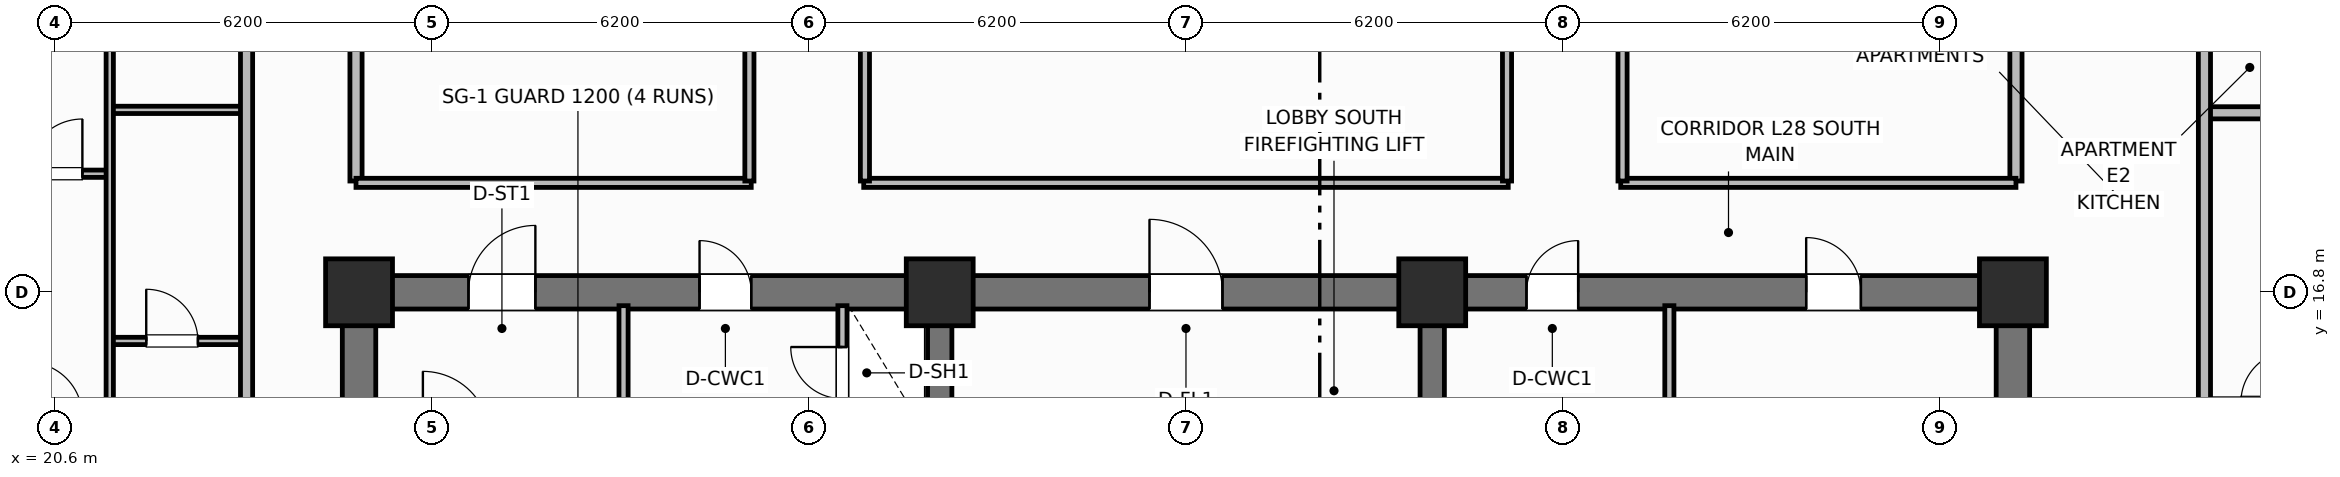
"""IFC4 building model, lengths in metres.
Left out: names, types, materials, properties, quantities, classifications, styles, units other than length and angle.
Written with IfcOpenShell. Run it as: python <this file> out.ifc"""

import sys

from ifc_helpers import new_model, si_unit, direction, frame, frame_2d, origin, origin_2d, place, context, subcontext, project, spatial, rectangle, extrude, element, fill, save


model = new_model("IFC4")
c1 = context("Model", 3, precision=1e-05, world=origin(), true_north=direction((0.0, 1.0)))
c2 = subcontext(c1, "Body", "Model", "MODEL_VIEW")
j1 = project(units=[si_unit("LENGTHUNIT", "METRE"), si_unit("PLANEANGLEUNIT", "RADIAN")], contexts=[c1])
p1 = place(None, origin())
s1 = spatial("IfcSite", under=j1, at=p1, CompositionType="ELEMENT")
p2 = place(p1, origin())
s2 = spatial("IfcBuilding", under=s1, at=p2, CompositionType="ELEMENT")
p3 = place(p2, frame((0.0, 0.0, 114.2)))
s3 = spatial("IfcBuildingStorey", under=s2, at=p3, CompositionType="ELEMENT", Elevation=114.2)
for number, where, z_axis, x_axis in (
    (1, (25.6, 10.875, 0.0), (0.0, 0.0, 1.0), (0.0, 1.0, 0.0)),
    (2, (52.8, 10.875, 0.0), (0.0, 0.0, 1.0), (0.0, 1.0, 0.0)),
):
    element("IfcWall", number, at=place(p3, frame(where, z_axis=z_axis, x_axis=x_axis)), inside=s3, PredefinedType="SHEAR", context=c2, shape_type="SweptSolid", body=[
        extrude(rectangle(XDim=5.65, YDim=0.55, at=frame_2d((2.825, 0.0))), origin(), (0.0, 0.0, 1.0), 3.7),
    ])
p4 = place(p3, frame((25.6, 16.8, 0.0), z_axis=(0.0, 0.0, 1.0), x_axis=(1.0, 0.0, 0.0)))
e3 = element("IfcWall", 3, at=p4, inside=s3, PredefinedType="SHEAR", context=c2, shape_type="SweptSolid", body=[
    extrude(rectangle(XDim=27.2, YDim=0.55, at=frame_2d((13.6, 0.0))), origin(), (0.0, 0.0, 1.0), 3.7),
])
p5 = place(p4, frame((1.8, 0.0, 0.0)))
e4 = element("IfcOpeningElement", 4, at=p5, cuts=e3, PredefinedType="OPENING", context=c2, shape_type="SweptSolid", body=[
    extrude(rectangle(XDim=1.1, YDim=2.15, at=frame_2d((0.55, 1.075))), frame((0.0, 0.285, 0.0), z_axis=(0.0, -1.0, 0.0), x_axis=(1.0, 0.0, 0.0)), (0.0, 0.0, 1.0), 0.57),
])
p6 = place(p4, frame((5.6, 0.0, 0.0)))
e5 = element("IfcOpeningElement", 5, at=p6, cuts=e3, PredefinedType="OPENING", context=c2, shape_type="SweptSolid", body=[
    extrude(rectangle(XDim=0.85, YDim=2.1, at=frame_2d((0.425, 1.05))), frame((0.0, 0.285, 0.0), z_axis=(0.0, -1.0, 0.0), x_axis=(1.0, 0.0, 0.0)), (0.0, 0.0, 1.0), 0.57),
])
p7 = place(p4, frame((13.0, 0.0, 0.0)))
e6 = element("IfcOpeningElement", 6, at=p7, cuts=e3, PredefinedType="OPENING", context=c2, shape_type="SweptSolid", body=[
    extrude(rectangle(XDim=1.2, YDim=2.15, at=frame_2d((0.6, 1.075))), frame((0.0, 0.285, 0.0), z_axis=(0.0, -1.0, 0.0), x_axis=(1.0, 0.0, 0.0)), (0.0, 0.0, 1.0), 0.57),
])
p8 = place(p4, frame((19.2, 0.0, 0.0)))
e7 = element("IfcOpeningElement", 7, at=p8, cuts=e3, PredefinedType="OPENING", context=c2, shape_type="SweptSolid", body=[
    extrude(rectangle(XDim=0.85, YDim=2.1, at=frame_2d((0.425, 1.05))), frame((0.0, 0.285, 0.0), z_axis=(0.0, -1.0, 0.0), x_axis=(1.0, 0.0, 0.0)), (0.0, 0.0, 1.0), 0.57),
])
p9 = place(p4, frame((23.8, 0.0, 0.0)))
e8 = element("IfcOpeningElement", 8, at=p9, cuts=e3, PredefinedType="OPENING", context=c2, shape_type="SweptSolid", body=[
    extrude(rectangle(XDim=0.9, YDim=2.1, at=frame_2d((0.45, 1.05))), frame((0.0, 0.285, 0.0), z_axis=(0.0, -1.0, 0.0), x_axis=(1.0, 0.0, 0.0)), (0.0, 0.0, 1.0), 0.57),
])
for number, where, z_axis, x_axis in (
    (9, (35.15, 10.875, 0.0), (0.0, 0.0, 1.0), (0.0, 1.0, 0.0)),
    (10, (43.25, 10.875, 0.0), (0.0, 0.0, 1.0), (0.0, 1.0, 0.0)),
):
    element("IfcWall", number, at=place(p3, frame(where, z_axis=z_axis, x_axis=x_axis)), inside=s3, PredefinedType="SHEAR", context=c2, shape_type="SweptSolid", body=[
        extrude(rectangle(XDim=5.65, YDim=0.4, at=frame_2d((2.825, 0.0))), origin(), (0.0, 0.0, 1.0), 3.7),
    ])
for number, where, z_axis, x_axis in (
    (11, (25.6, 16.8, 0.0), (0.0, 0.0, 1.0), (1.0, 0.0, 0.0)),
    (12, (35.15, 16.8, 0.0), (0.0, 0.0, 1.0), (1.0, 0.0, 0.0)),
    (13, (43.25, 16.8, 0.0), (0.0, 0.0, 1.0), (1.0, 0.0, 0.0)),
    (14, (52.8, 16.8, 0.0), (0.0, 0.0, 1.0), (1.0, 0.0, 0.0)),
):
    element("IfcColumn", number, at=place(p3, frame(where, z_axis=z_axis, x_axis=x_axis)), inside=s3, PredefinedType="COLUMN", context=c2, shape_type="SweptSolid", body=[
        extrude(rectangle(XDim=1.1, YDim=1.1, at=origin_2d()), origin(), (0.0, 0.0, 1.0), 3.7),
    ])
p10 = place(p3, frame((29.95, 14.5, 0.0), z_axis=(0.0, 0.0, 1.0), x_axis=(0.0, 1.0, 0.0)))
e15 = element("IfcWall", 15, at=p10, inside=s3, PredefinedType="PARTITIONING", context=c2, shape_type="SweptSolid", body=[
    extrude(rectangle(XDim=2.08, YDim=0.15, at=frame_2d((1.04, 0.0))), origin(), (0.0, 0.0, 1.0), 2.53),
])
p11 = place(p3, frame((33.55, 14.5, 0.0), z_axis=(0.0, 0.0, 1.0), x_axis=(0.0, 1.0, 0.0)))
e16 = element("IfcWall", 16, at=p11, inside=s3, PredefinedType="PARTITIONING", context=c2, shape_type="SweptSolid", body=[
    extrude(rectangle(XDim=2.08, YDim=0.15, at=frame_2d((1.04, 0.0))), origin(), (0.0, 0.0, 1.0), 2.53),
])
p12 = place(p11, frame((0.55, 0.0, 0.0)))
e17 = element("IfcOpeningElement", 17, at=p12, cuts=e16, PredefinedType="OPENING", context=c2, shape_type="SweptSolid", body=[
    extrude(rectangle(XDim=0.85, YDim=2.05, at=frame_2d((0.425, 1.025))), frame((0.0, 0.085, 0.0), z_axis=(0.0, -1.0, 0.0), x_axis=(1.0, 0.0, 0.0)), (0.0, 0.0, 1.0), 0.17),
])
p13 = place(p3, frame((47.15, 10.95, 0.0), z_axis=(0.0, 0.0, 1.0), x_axis=(0.0, 1.0, 0.0)))
e18 = element("IfcWall", 18, at=p13, inside=s3, PredefinedType="PARTITIONING", context=c2, shape_type="SweptSolid", body=[
    extrude(rectangle(XDim=5.63, YDim=0.15, at=frame_2d((2.815, 0.0))), origin(), (0.0, 0.0, 1.0), 2.53),
])
for number, where, z_axis, x_axis in (
    (19, (25.55, 18.63, 0.0), (0.0, 0.0, 1.0), (0.0, 1.0, 0.0)),
    (20, (52.85, 18.63, 0.0), (0.0, 0.0, 1.0), (0.0, 1.0, 0.0)),
):
    element("IfcWall", number, at=place(p3, frame(where, z_axis=z_axis, x_axis=x_axis)), inside=s3, PredefinedType="PARTITIONING", context=c2, shape_type="SweptSolid", body=[
        extrude(rectangle(XDim=19.14, YDim=0.2, at=frame_2d((9.57, 0.0))), origin(), (0.0, 0.0, 1.0), 2.53),
    ])
p14 = place(p3, frame((25.55, 18.6, 0.0), z_axis=(0.0, 0.0, 1.0), x_axis=(1.0, 0.0, 0.0)))
e21 = element("IfcWall", 21, at=p14, inside=s3, PredefinedType="PARTITIONING", context=c2, shape_type="SweptSolid", body=[
    extrude(rectangle(XDim=6.5, YDim=0.15, at=frame_2d((3.25, 0.0))), origin(), (0.0, 0.0, 1.0), 2.53),
])
p15 = place(p3, frame((33.9, 18.6, 0.0), z_axis=(0.0, 0.0, 1.0), x_axis=(1.0, 0.0, 0.0)))
e22 = element("IfcWall", 22, at=p15, inside=s3, PredefinedType="PARTITIONING", context=c2, shape_type="SweptSolid", body=[
    extrude(rectangle(XDim=10.6, YDim=0.15, at=frame_2d((5.3, 0.0))), origin(), (0.0, 0.0, 1.0), 2.53),
])
p16 = place(p3, frame((46.35, 18.6, 0.0), z_axis=(0.0, 0.0, 1.0), x_axis=(1.0, 0.0, 0.0)))
e23 = element("IfcWall", 23, at=p16, inside=s3, PredefinedType="PARTITIONING", context=c2, shape_type="SweptSolid", body=[
    extrude(rectangle(XDim=6.5, YDim=0.15, at=frame_2d((3.25, 0.0))), origin(), (0.0, 0.0, 1.0), 2.53),
])
p17 = place(p3, frame((32.02, 18.63, 0.0), z_axis=(0.0, 0.0, 1.0), x_axis=(0.0, 1.0, 0.0)))
e24 = element("IfcWall", 24, at=p17, inside=s3, PredefinedType="PARTITIONING", context=c2, shape_type="SweptSolid", body=[
    extrude(rectangle(XDim=19.14, YDim=0.15, at=frame_2d((9.57, 0.0))), origin(), (0.0, 0.0, 1.0), 2.53),
])
p18 = place(p17, frame((5.5, 0.0, 0.0)))
e25 = element("IfcOpeningElement", 25, at=p18, cuts=e24, PredefinedType="OPENING", context=c2, shape_type="SweptSolid", body=[
    extrude(rectangle(XDim=1.0, YDim=2.15, at=frame_2d((0.5, 1.075))), frame((0.0, 0.085, 0.0), z_axis=(0.0, -1.0, 0.0), x_axis=(1.0, 0.0, 0.0)), (0.0, 0.0, 1.0), 0.17),
])
p19 = place(p3, frame((33.92, 18.63, 0.0), z_axis=(0.0, 0.0, 1.0), x_axis=(0.0, 1.0, 0.0)))
e26 = element("IfcWall", 26, at=p19, inside=s3, PredefinedType="PARTITIONING", context=c2, shape_type="SweptSolid", body=[
    extrude(rectangle(XDim=19.14, YDim=0.15, at=frame_2d((9.57, 0.0))), origin(), (0.0, 0.0, 1.0), 2.53),
])
p20 = place(p19, frame((2.4, 0.0, 0.0)))
e27 = element("IfcOpeningElement", 27, at=p20, cuts=e26, PredefinedType="OPENING", context=c2, shape_type="SweptSolid", body=[
    extrude(rectangle(XDim=1.0, YDim=2.15, at=frame_2d((0.5, 1.075))), frame((0.0, 0.085, 0.0), z_axis=(0.0, -1.0, 0.0), x_axis=(1.0, 0.0, 0.0)), (0.0, 0.0, 1.0), 0.17),
])
p21 = place(p3, frame((44.48, 18.63, 0.0), z_axis=(0.0, 0.0, 1.0), x_axis=(0.0, 1.0, 0.0)))
e28 = element("IfcWall", 28, at=p21, inside=s3, PredefinedType="PARTITIONING", context=c2, shape_type="SweptSolid", body=[
    extrude(rectangle(XDim=19.14, YDim=0.15, at=frame_2d((9.57, 0.0))), origin(), (0.0, 0.0, 1.0), 2.53),
])
p22 = place(p21, frame((10.804, 0.0, 0.0)))
e29 = element("IfcOpeningElement", 29, at=p22, cuts=e28, PredefinedType="OPENING", context=c2, shape_type="SweptSolid", body=[
    extrude(rectangle(XDim=1.0, YDim=2.15, at=frame_2d((0.5, 1.075))), frame((0.0, 0.085, 0.0), z_axis=(0.0, -1.0, 0.0), x_axis=(1.0, 0.0, 0.0)), (0.0, 0.0, 1.0), 0.17),
])
p23 = place(p3, frame((46.38, 18.63, 0.0), z_axis=(0.0, 0.0, 1.0), x_axis=(0.0, 1.0, 0.0)))
e30 = element("IfcWall", 30, at=p23, inside=s3, PredefinedType="PARTITIONING", context=c2, shape_type="SweptSolid", body=[
    extrude(rectangle(XDim=19.14, YDim=0.15, at=frame_2d((9.57, 0.0))), origin(), (0.0, 0.0, 1.0), 2.53),
])
p24 = place(p23, frame((5.5, 0.0, 0.0)))
e31 = element("IfcOpeningElement", 31, at=p24, cuts=e30, PredefinedType="OPENING", context=c2, shape_type="SweptSolid", body=[
    extrude(rectangle(XDim=1.0, YDim=2.15, at=frame_2d((0.5, 1.075))), frame((0.0, 0.085, 0.0), z_axis=(0.0, -1.0, 0.0), x_axis=(1.0, 0.0, 0.0)), (0.0, 0.0, 1.0), 0.17),
])
p25 = place(p3, frame((21.5, 16.0, 0.0), z_axis=(0.0, 0.0, 1.0), x_axis=(1.0, 0.0, 0.0)))
e32 = element("IfcWall", 32, at=p25, inside=s3, PredefinedType="PARTITIONING", context=c2, shape_type="SweptSolid", body=[
    extrude(rectangle(XDim=2.25, YDim=0.12, at=frame_2d((1.125, 0.0))), origin(), (0.0, 0.0, 1.0), 2.53),
])
p26 = place(p25, frame((0.6, 0.0, 0.0)))
e33 = element("IfcOpeningElement", 33, at=p26, cuts=e32, PredefinedType="OPENING", context=c2, shape_type="SweptSolid", body=[
    extrude(rectangle(XDim=0.85, YDim=2.1, at=frame_2d((0.425, 1.05))), frame((0.0, 0.07, 0.0), z_axis=(0.0, -1.0, 0.0), x_axis=(1.0, 0.0, 0.0)), (0.0, 0.0, 1.0), 0.14),
])
p27 = place(p3, frame((21.5, 19.8, 0.0), z_axis=(0.0, 0.0, 1.0), x_axis=(1.0, 0.0, 0.0)))
e34 = element("IfcWall", 34, at=p27, inside=s3, PredefinedType="PARTITIONING", context=c2, shape_type="SweptSolid", body=[
    extrude(rectangle(XDim=2.25, YDim=0.12, at=frame_2d((1.125, 0.0))), origin(), (0.0, 0.0, 1.0), 2.53),
])
p28 = place(p3, frame((14.57, 18.75, 0.0), z_axis=(0.0, 0.0, 1.0), x_axis=(1.0, 0.0, 0.0)))
e35 = element("IfcWall", 35, at=p28, inside=s3, PredefinedType="PARTITIONING", context=c2, shape_type="SweptSolid", body=[
    extrude(rectangle(XDim=6.93, YDim=0.12, at=frame_2d((3.465, 0.0))), origin(), (0.0, 0.0, 1.0), 2.53),
])
p29 = place(p28, frame((5.58, 0.0, 0.0)))
e36 = element("IfcOpeningElement", 36, at=p29, cuts=e35, PredefinedType="OPENING", context=c2, shape_type="SweptSolid", body=[
    extrude(rectangle(XDim=0.9, YDim=2.1, at=frame_2d((0.45, 1.05))), frame((0.0, 0.07, 0.0), z_axis=(0.0, -1.0, 0.0), x_axis=(1.0, 0.0, 0.0)), (0.0, 0.0, 1.0), 0.14),
])
p30 = place(p3, frame((21.5, 10.64, 0.0), z_axis=(0.0, 0.0, 1.0), x_axis=(0.0, 1.0, 0.0)))
e37 = element("IfcWall", 37, at=p30, inside=s3, PredefinedType="PARTITIONING", context=c2, shape_type="SweptSolid", body=[
    extrude(rectangle(XDim=12.24, YDim=0.12, at=frame_2d((6.12, 0.0))), origin(), (0.0, 0.0, 1.0), 2.53),
])
p31 = place(p30, frame((0.41, 0.0, 0.0)))
e38 = element("IfcOpeningElement", 38, at=p31, cuts=e37, PredefinedType="OPENING", context=c2, shape_type="SweptSolid", body=[
    extrude(rectangle(XDim=0.9, YDim=2.1, at=frame_2d((0.45, 1.05))), frame((0.0, 0.07, 0.0), z_axis=(0.0, -1.0, 0.0), x_axis=(1.0, 0.0, 0.0)), (0.0, 0.0, 1.0), 0.14),
])
p32 = place(p30, frame((10.295, 0.0, 0.0)))
e39 = element("IfcOpeningElement", 39, at=p32, cuts=e37, PredefinedType="OPENING", context=c2, shape_type="SweptSolid", body=[
    extrude(rectangle(XDim=0.82, YDim=2.08, at=frame_2d((0.41, 1.04))), frame((0.0, 0.07, 0.0), z_axis=(0.0, -1.0, 0.0), x_axis=(1.0, 0.0, 0.0)), (0.0, 0.0, 1.0), 0.14),
])
p33 = place(p3, frame((23.75, 10.6, 0.0), z_axis=(0.0, 0.0, 1.0), x_axis=(0.0, 1.0, 0.0)))
e40 = element("IfcWall", 40, at=p33, inside=s3, PredefinedType="PARTITIONING", context=c2, shape_type="SweptSolid", body=[
    extrude(rectangle(XDim=35.2, YDim=0.2, at=frame_2d((17.6, 0.0))), origin(), (0.0, 0.0, 1.0), 2.53),
])
p34 = place(p33, frame((2.65, 0.0, 0.0)))
e41 = element("IfcOpeningElement", 41, at=p34, cuts=e40, PredefinedType="OPENING", context=c2, shape_type="SweptSolid", body=[
    extrude(rectangle(XDim=1.0, YDim=2.15, at=frame_2d((0.5, 1.075))), frame((0.0, 0.11, 0.0), z_axis=(0.0, -1.0, 0.0), x_axis=(1.0, 0.0, 0.0)), (0.0, 0.0, 1.0), 0.22),
])
p35 = place(p33, frame((12.87, 0.0, 0.0)))
e42 = element("IfcOpeningElement", 42, at=p35, cuts=e40, PredefinedType="OPENING", context=c2, shape_type="SweptSolid", body=[
    extrude(rectangle(XDim=1.0, YDim=2.15, at=frame_2d((0.5, 1.075))), frame((0.0, 0.11, 0.0), z_axis=(0.0, -1.0, 0.0), x_axis=(1.0, 0.0, 0.0)), (0.0, 0.0, 1.0), 0.22),
])
p36 = place(p33, frame((24.486, 0.0, 0.0)))
e43 = element("IfcOpeningElement", 43, at=p36, cuts=e40, PredefinedType="OPENING", context=c2, shape_type="SweptSolid", body=[
    extrude(rectangle(XDim=1.0, YDim=2.15, at=frame_2d((0.5, 1.075))), frame((0.0, 0.11, 0.0), z_axis=(0.0, -1.0, 0.0), x_axis=(1.0, 0.0, 0.0)), (0.0, 0.0, 1.0), 0.22),
])
p37 = place(p3, frame((55.95, 19.752, 0.0), z_axis=(0.0, 0.0, 1.0), x_axis=(1.0, 0.0, 0.0)))
e44 = element("IfcWall", 44, at=p37, inside=s3, PredefinedType="PARTITIONING", context=c2, shape_type="SweptSolid", body=[
    extrude(rectangle(XDim=7.88, YDim=0.2, at=frame_2d((3.94, 0.0))), origin(), (0.0, 0.0, 1.0), 2.53),
])
p38 = place(p3, frame((55.95, 10.6, 0.0), z_axis=(0.0, 0.0, 1.0), x_axis=(0.0, 1.0, 0.0)))
e45 = element("IfcWall", 45, at=p38, inside=s3, PredefinedType="PARTITIONING", context=c2, shape_type="SweptSolid", body=[
    extrude(rectangle(XDim=35.2, YDim=0.2, at=frame_2d((17.6, 0.0))), origin(), (0.0, 0.0, 1.0), 2.53),
])
p39 = place(p38, frame((2.65, 0.0, 0.0)))
e46 = element("IfcOpeningElement", 46, at=p39, cuts=e45, PredefinedType="OPENING", context=c2, shape_type="SweptSolid", body=[
    extrude(rectangle(XDim=1.0, YDim=2.15, at=frame_2d((0.5, 1.075))), frame((0.0, 0.11, 0.0), z_axis=(0.0, -1.0, 0.0), x_axis=(1.0, 0.0, 0.0)), (0.0, 0.0, 1.0), 0.22),
])
p40 = place(p38, frame((11.352, 0.0, 0.0)))
e47 = element("IfcOpeningElement", 47, at=p40, cuts=e45, PredefinedType="OPENING", context=c2, shape_type="SweptSolid", body=[
    extrude(rectangle(XDim=1.0, YDim=2.15, at=frame_2d((0.5, 1.075))), frame((0.0, 0.11, 0.0), z_axis=(0.0, -1.0, 0.0), x_axis=(1.0, 0.0, 0.0)), (0.0, 0.0, 1.0), 0.22),
])
p41 = place(p38, frame((21.37, 0.0, 0.0)))
e48 = element("IfcOpeningElement", 48, at=p41, cuts=e45, PredefinedType="OPENING", context=c2, shape_type="SweptSolid", body=[
    extrude(rectangle(XDim=1.0, YDim=2.15, at=frame_2d((0.5, 1.075))), frame((0.0, 0.11, 0.0), z_axis=(0.0, -1.0, 0.0), x_axis=(1.0, 0.0, 0.0)), (0.0, 0.0, 1.0), 0.22),
])
p42 = place(p38, frame((27.302, 0.0, 0.0)))
e49 = element("IfcOpeningElement", 49, at=p42, cuts=e45, PredefinedType="OPENING", context=c2, shape_type="SweptSolid", body=[
    extrude(rectangle(XDim=1.0, YDim=2.15, at=frame_2d((0.5, 1.075))), frame((0.0, 0.11, 0.0), z_axis=(0.0, -1.0, 0.0), x_axis=(1.0, 0.0, 0.0)), (0.0, 0.0, 1.0), 0.22),
])
p43 = place(p12, origin())
e50 = element("IfcDoor", 50, at=p43, inside=s3, OperationType="SINGLE_SWING_RIGHT", PredefinedType="TRAPDOOR", context=c2, shape_type="SweptSolid", body=[
    extrude(rectangle(XDim=0.85, YDim=2.05, at=frame_2d((0.425, 1.025))), frame((0.0, 0.025, 0.0), z_axis=(0.0, -1.0, 0.0), x_axis=(1.0, 0.0, 0.0)), (0.0, 0.0, 1.0), 0.05),
])
fill(e17, e50)
p44 = place(p26, origin())
e51 = element("IfcDoor", 51, at=p44, inside=s3, OperationType="SINGLE_SWING_LEFT", PredefinedType="DOOR", context=c2, shape_type="SweptSolid", body=[
    extrude(rectangle(XDim=0.85, YDim=2.1, at=frame_2d((0.425, 1.05))), frame((0.0, 0.025, 0.0), z_axis=(0.0, -1.0, 0.0), x_axis=(1.0, 0.0, 0.0)), (0.0, 0.0, 1.0), 0.05),
])
fill(e33, e51)
p45 = place(p29, origin())
e52 = element("IfcDoor", 52, at=p45, inside=s3, OperationType="SINGLE_SWING_RIGHT", PredefinedType="DOOR", context=c2, shape_type="SweptSolid", body=[
    extrude(rectangle(XDim=0.9, YDim=2.1, at=frame_2d((0.45, 1.05))), frame((0.0, 0.025, 0.0), z_axis=(0.0, -1.0, 0.0), x_axis=(1.0, 0.0, 0.0)), (0.0, 0.0, 1.0), 0.05),
])
fill(e36, e52)
p46 = place(p5, origin())
e53 = element("IfcDoor", 53, at=p46, inside=s3, OperationType="SINGLE_SWING_RIGHT", PredefinedType="DOOR", context=c2, shape_type="SweptSolid", body=[
    extrude(rectangle(XDim=1.1, YDim=2.15, at=frame_2d((0.55, 1.075))), frame((0.0, 0.025, 0.0), z_axis=(0.0, -1.0, 0.0), x_axis=(1.0, 0.0, 0.0)), (0.0, 0.0, 1.0), 0.05),
])
fill(e4, e53)
p47 = place(p6, origin())
e54 = element("IfcDoor", 54, at=p47, inside=s3, OperationType="SINGLE_SWING_LEFT", PredefinedType="DOOR", context=c2, shape_type="SweptSolid", body=[
    extrude(rectangle(XDim=0.85, YDim=2.1, at=frame_2d((0.425, 1.05))), frame((0.0, 0.025, 0.0), z_axis=(0.0, -1.0, 0.0), x_axis=(1.0, 0.0, 0.0)), (0.0, 0.0, 1.0), 0.05),
])
fill(e5, e54)
p48 = place(p7, origin())
e55 = element("IfcDoor", 55, at=p48, inside=s3, OperationType="SINGLE_SWING_LEFT", PredefinedType="DOOR", context=c2, shape_type="SweptSolid", body=[
    extrude(rectangle(XDim=1.2, YDim=2.15, at=frame_2d((0.6, 1.075))), frame((0.0, 0.025, 0.0), z_axis=(0.0, -1.0, 0.0), x_axis=(1.0, 0.0, 0.0)), (0.0, 0.0, 1.0), 0.05),
])
fill(e6, e55)
p49 = place(p8, origin())
e56 = element("IfcDoor", 56, at=p49, inside=s3, OperationType="SINGLE_SWING_RIGHT", PredefinedType="DOOR", context=c2, shape_type="SweptSolid", body=[
    extrude(rectangle(XDim=0.85, YDim=2.1, at=frame_2d((0.425, 1.05))), frame((0.0, 0.025, 0.0), z_axis=(0.0, -1.0, 0.0), x_axis=(1.0, 0.0, 0.0)), (0.0, 0.0, 1.0), 0.05),
])
fill(e7, e56)
p50 = place(p9, origin())
e57 = element("IfcDoor", 57, at=p50, inside=s3, OperationType="SINGLE_SWING_LEFT", PredefinedType="DOOR", context=c2, shape_type="SweptSolid", body=[
    extrude(rectangle(XDim=0.9, YDim=2.1, at=frame_2d((0.45, 1.05))), frame((0.0, 0.025, 0.0), z_axis=(0.0, -1.0, 0.0), x_axis=(1.0, 0.0, 0.0)), (0.0, 0.0, 1.0), 0.05),
])
fill(e8, e57)
save(model, sys.argv[1])
